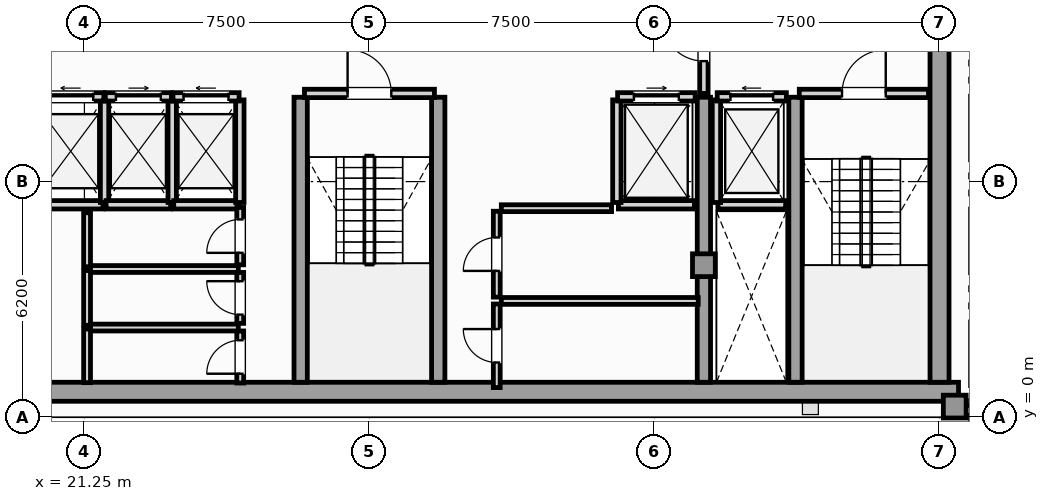
"""IFC4 building model, lengths in metres.
Left out: names, types, materials, properties, quantities, classifications, styles, units other than length and angle.
Written with IfcOpenShell. Run it as: python <this file> out.ifc"""

import sys

from ifc_helpers import new_model, si_unit, direction, frame, frame_2d, origin, origin_2d, place, context, subcontext, project, spatial, rectangle, extrude, element, fill, save


model = new_model("IFC4")
c1 = context("Model", 3, precision=1e-05, world=origin(), true_north=direction((0.0, 1.0)))
c2 = subcontext(c1, "Body", "Model", "MODEL_VIEW")
j1 = project(units=[si_unit("LENGTHUNIT", "METRE"), si_unit("PLANEANGLEUNIT", "RADIAN")], contexts=[c1])
p1 = place(None, origin())
s1 = spatial("IfcSite", under=j1, at=p1, CompositionType="ELEMENT")
p2 = place(p1, origin())
s2 = spatial("IfcBuilding", under=s1, at=p2, CompositionType="ELEMENT")
p3 = place(p2, frame((0.0, 0.0, 337.5)))
s3 = spatial("IfcBuildingStorey", under=s2, at=p3, CompositionType="ELEMENT", Elevation=337.5)
p4 = place(p3, frame((13.25, 0.67, 0.0), z_axis=(0.0, 0.0, 1.0), x_axis=(1.0, 0.0, 0.0)))
e1 = element("IfcWall", 1, at=p4, inside=s3, PredefinedType="SHEAR", context=c2, shape_type="SweptSolid", body=[
    extrude(rectangle(XDim=31.0, YDim=0.5, at=frame_2d((15.5, 0.0))), origin(), (0.0, 0.0, 1.0), 3.63),
])
p5 = place(p3, frame((43.75, 0.92, 0.0), z_axis=(0.0, 0.0, 1.0), x_axis=(0.0, 1.0, 0.0)))
e2 = element("IfcWall", 2, at=p5, inside=s3, PredefinedType="SHEAR", context=c2, shape_type="SweptSolid", body=[
    extrude(rectangle(XDim=10.53, YDim=0.5, at=frame_2d((5.265, 0.0))), origin(), (0.0, 0.0, 1.0), 3.63),
])
for number, where, z_axis, x_axis in (
    (3, (26.94, 0.92, 0.0), (0.0, 0.0, 1.0), (0.0, 1.0, 0.0)),
    (4, (30.56, 0.92, 0.0), (0.0, 0.0, 1.0), (0.0, 1.0, 0.0)),
    (5, (37.55, 0.92, 0.0), (0.0, 0.0, 1.0), (0.0, 1.0, 0.0)),
    (6, (39.96, 0.92, 0.0), (0.0, 0.0, 1.0), (0.0, 1.0, 0.0)),
):
    element("IfcWall", number, at=place(p3, frame(where, z_axis=z_axis, x_axis=x_axis)), inside=s3, PredefinedType="SHEAR", context=c2, shape_type="SweptSolid", body=[
        extrude(rectangle(XDim=7.5, YDim=0.35, at=frame_2d((3.75, 0.0))), origin(), (0.0, 0.0, 1.0), 3.63),
    ])
for number, where, z_axis, x_axis in (
    (7, (44.15, 0.28, 0.0), (0.0, 0.0, 1.0), (1.0, 0.0, 0.0)),
    (8, (37.55, 4.0, 0.0), (0.0, 0.0, 1.0), (1.0, 0.0, 0.0)),
):
    element("IfcColumn", number, at=place(p3, frame(where, z_axis=z_axis, x_axis=x_axis)), inside=s3, PredefinedType="COLUMN", context=c2, shape_type="SweptSolid", body=[
        extrude(rectangle(XDim=0.6, YDim=0.6, at=origin_2d()), origin(), (0.0, 0.0, 1.0), 3.85),
    ])
p6 = place(p3, frame((44.25, 0.18, 0.0), z_axis=(0.0, 0.0, 1.0), x_axis=(1.0, 0.0, 0.0)))
e9 = element("IfcWall", 9, at=p6, inside=s3, PredefinedType="SOLIDWALL", context=c2, shape_type="SweptSolid", body=[
    extrude(rectangle(XDim=0.662, YDim=0.26, at=frame_2d((0.331, 0.0))), origin(), (0.0, 0.0, 1.0), 3.63),
])
p7 = place(p3, frame((37.92, 5.59, 0.0), z_axis=(0.0, 0.0, 1.0), x_axis=(1.0, 0.0, 0.0)))
e10 = element("IfcWall", 10, at=p7, inside=s3, PredefinedType="SOLIDWALL", context=c2, shape_type="SweptSolid", body=[
    extrude(rectangle(XDim=1.78, YDim=0.22, at=frame_2d((0.89, 0.0))), origin(), (0.0, 0.0, 1.0), 3.63),
])
p8 = place(p3, frame((37.88, 5.65, 0.0), z_axis=(0.0, 0.0, 1.0), x_axis=(0.0, 1.0, 0.0)))
e11 = element("IfcWall", 11, at=p8, inside=s3, PredefinedType="SOLIDWALL", context=c2, shape_type="SweptSolid", body=[
    extrude(rectangle(XDim=2.7, YDim=0.22, at=frame_2d((1.35, 0.0))), origin(), (0.0, 0.0, 1.0), 3.63),
])
p9 = place(p3, frame((37.9, 8.43, 0.0), z_axis=(0.0, 0.0, 1.0), x_axis=(1.0, 0.0, 0.0)))
e12 = element("IfcWall", 12, at=p9, inside=s3, PredefinedType="SOLIDWALL", context=c2, shape_type="SweptSolid", body=[
    extrude(rectangle(XDim=1.82, YDim=0.22, at=frame_2d((0.91, 0.0))), origin(), (0.0, 0.0, 1.0), 3.63),
])
p10 = place(p9, frame((0.35, 0.0, 0.0)))
e13 = element("IfcOpeningElement", 13, at=p10, cuts=e12, PredefinedType="OPENING", context=c2, shape_type="SweptSolid", body=[
    extrude(rectangle(XDim=1.12, YDim=2.25, at=frame_2d((0.56, 1.125))), frame((0.0, 0.12, 0.0), z_axis=(0.0, -1.0, 0.0), x_axis=(1.0, 0.0, 0.0)), (0.0, 0.0, 1.0), 0.24),
])
p11 = place(p3, frame((35.3, 5.59, 0.0), z_axis=(0.0, 0.0, 1.0), x_axis=(1.0, 0.0, 0.0)))
e14 = element("IfcWall", 14, at=p11, inside=s3, PredefinedType="SOLIDWALL", context=c2, shape_type="SweptSolid", body=[
    extrude(rectangle(XDim=2.0, YDim=0.22, at=frame_2d((1.0, 0.0))), origin(), (0.0, 0.0, 1.0), 3.63),
])
p12 = place(p3, frame((35.26, 5.65, 0.0), z_axis=(0.0, 0.0, 1.0), x_axis=(0.0, 1.0, 0.0)))
e15 = element("IfcWall", 15, at=p12, inside=s3, PredefinedType="SOLIDWALL", context=c2, shape_type="SweptSolid", body=[
    extrude(rectangle(XDim=2.7, YDim=0.22, at=frame_2d((1.35, 0.0))), origin(), (0.0, 0.0, 1.0), 3.63),
])
p13 = place(p3, frame((35.28, 8.43, 0.0), z_axis=(0.0, 0.0, 1.0), x_axis=(1.0, 0.0, 0.0)))
e16 = element("IfcWall", 16, at=p13, inside=s3, PredefinedType="SOLIDWALL", context=c2, shape_type="SweptSolid", body=[
    extrude(rectangle(XDim=2.04, YDim=0.22, at=frame_2d((1.02, 0.0))), origin(), (0.0, 0.0, 1.0), 3.63),
])
p14 = place(p13, frame((0.43, 0.0, 0.0)))
e17 = element("IfcOpeningElement", 17, at=p14, cuts=e16, PredefinedType="OPENING", context=c2, shape_type="SweptSolid", body=[
    extrude(rectangle(XDim=1.18, YDim=2.2, at=frame_2d((0.59, 1.1))), frame((0.0, 0.12, 0.0), z_axis=(0.0, -1.0, 0.0), x_axis=(1.0, 0.0, 0.0)), (0.0, 0.0, 1.0), 0.24),
])
p15 = place(p3, frame((20.04, 5.59, 0.0), z_axis=(0.0, 0.0, 1.0), x_axis=(1.0, 0.0, 0.0)))
e18 = element("IfcWall", 18, at=p15, inside=s3, PredefinedType="SOLIDWALL", context=c2, shape_type="SweptSolid", body=[
    extrude(rectangle(XDim=1.7, YDim=0.22, at=frame_2d((0.85, 0.0))), origin(), (0.0, 0.0, 1.0), 3.63),
])
p16 = place(p3, frame((21.78, 5.65, 0.0), z_axis=(0.0, 0.0, 1.0), x_axis=(0.0, 1.0, 0.0)))
e19 = element("IfcWall", 19, at=p16, inside=s3, PredefinedType="SOLIDWALL", context=c2, shape_type="SweptSolid", body=[
    extrude(rectangle(XDim=2.7, YDim=0.22, at=frame_2d((1.35, 0.0))), origin(), (0.0, 0.0, 1.0), 3.63),
])
p17 = place(p3, frame((20.02, 8.43, 0.0), z_axis=(0.0, 0.0, 1.0), x_axis=(1.0, 0.0, 0.0)))
e20 = element("IfcWall", 20, at=p17, inside=s3, PredefinedType="SOLIDWALL", context=c2, shape_type="SweptSolid", body=[
    extrude(rectangle(XDim=1.74, YDim=0.22, at=frame_2d((0.87, 0.0))), origin(), (0.0, 0.0, 1.0), 3.63),
])
p18 = place(p17, frame((0.28, 0.0, 0.0)))
e21 = element("IfcOpeningElement", 21, at=p18, cuts=e20, PredefinedType="OPENING", context=c2, shape_type="SweptSolid", body=[
    extrude(rectangle(XDim=1.18, YDim=2.2, at=frame_2d((0.59, 1.1))), frame((0.0, 0.12, 0.0), z_axis=(0.0, -1.0, 0.0), x_axis=(1.0, 0.0, 0.0)), (0.0, 0.0, 1.0), 0.24),
])
p19 = place(p3, frame((21.82, 5.59, 0.0), z_axis=(0.0, 0.0, 1.0), x_axis=(1.0, 0.0, 0.0)))
e22 = element("IfcWall", 22, at=p19, inside=s3, PredefinedType="SOLIDWALL", context=c2, shape_type="SweptSolid", body=[
    extrude(rectangle(XDim=1.7, YDim=0.22, at=frame_2d((0.85, 0.0))), origin(), (0.0, 0.0, 1.0), 3.63),
])
p20 = place(p3, frame((23.56, 5.65, 0.0), z_axis=(0.0, 0.0, 1.0), x_axis=(0.0, 1.0, 0.0)))
e23 = element("IfcWall", 23, at=p20, inside=s3, PredefinedType="SOLIDWALL", context=c2, shape_type="SweptSolid", body=[
    extrude(rectangle(XDim=2.7, YDim=0.22, at=frame_2d((1.35, 0.0))), origin(), (0.0, 0.0, 1.0), 3.63),
])
p21 = place(p3, frame((21.8, 8.43, 0.0), z_axis=(0.0, 0.0, 1.0), x_axis=(1.0, 0.0, 0.0)))
e24 = element("IfcWall", 24, at=p21, inside=s3, PredefinedType="SOLIDWALL", context=c2, shape_type="SweptSolid", body=[
    extrude(rectangle(XDim=1.74, YDim=0.22, at=frame_2d((0.87, 0.0))), origin(), (0.0, 0.0, 1.0), 3.63),
])
p22 = place(p21, frame((0.28, 0.0, 0.0)))
e25 = element("IfcOpeningElement", 25, at=p22, cuts=e24, PredefinedType="OPENING", context=c2, shape_type="SweptSolid", body=[
    extrude(rectangle(XDim=1.18, YDim=2.2, at=frame_2d((0.59, 1.1))), frame((0.0, 0.12, 0.0), z_axis=(0.0, -1.0, 0.0), x_axis=(1.0, 0.0, 0.0)), (0.0, 0.0, 1.0), 0.24),
])
p23 = place(p3, frame((23.6, 5.59, 0.0), z_axis=(0.0, 0.0, 1.0), x_axis=(1.0, 0.0, 0.0)))
e26 = element("IfcWall", 26, at=p23, inside=s3, PredefinedType="SOLIDWALL", context=c2, shape_type="SweptSolid", body=[
    extrude(rectangle(XDim=1.7, YDim=0.22, at=frame_2d((0.85, 0.0))), origin(), (0.0, 0.0, 1.0), 3.63),
])
p24 = place(p3, frame((25.34, 5.65, 0.0), z_axis=(0.0, 0.0, 1.0), x_axis=(0.0, 1.0, 0.0)))
e27 = element("IfcWall", 27, at=p24, inside=s3, PredefinedType="SOLIDWALL", context=c2, shape_type="SweptSolid", body=[
    extrude(rectangle(XDim=2.7, YDim=0.22, at=frame_2d((1.35, 0.0))), origin(), (0.0, 0.0, 1.0), 3.63),
])
p25 = place(p3, frame((23.58, 8.43, 0.0), z_axis=(0.0, 0.0, 1.0), x_axis=(1.0, 0.0, 0.0)))
e28 = element("IfcWall", 28, at=p25, inside=s3, PredefinedType="SOLIDWALL", context=c2, shape_type="SweptSolid", body=[
    extrude(rectangle(XDim=1.74, YDim=0.22, at=frame_2d((0.87, 0.0))), origin(), (0.0, 0.0, 1.0), 3.63),
])
p26 = place(p25, frame((0.28, 0.0, 0.0)))
e29 = element("IfcOpeningElement", 29, at=p26, cuts=e28, PredefinedType="OPENING", context=c2, shape_type="SweptSolid", body=[
    extrude(rectangle(XDim=1.18, YDim=2.2, at=frame_2d((0.59, 1.1))), frame((0.0, 0.12, 0.0), z_axis=(0.0, -1.0, 0.0), x_axis=(1.0, 0.0, 0.0)), (0.0, 0.0, 1.0), 0.24),
])
p27 = place(p3, frame((40.06, 8.52, 0.0), z_axis=(0.0, 0.0, 1.0), x_axis=(1.0, 0.0, 0.0)))
e30 = element("IfcWall", 30, at=p27, inside=s3, PredefinedType="SOLIDWALL", context=c2, shape_type="SweptSolid", body=[
    extrude(rectangle(XDim=3.4, YDim=0.22, at=frame_2d((1.7, 0.0))), origin(), (0.0, 0.0, 1.0), 3.63),
])
p28 = place(p27, frame((1.125, 0.0, 0.0)))
e31 = element("IfcOpeningElement", 31, at=p28, cuts=e30, PredefinedType="OPENING", context=c2, shape_type="SweptSolid", body=[
    extrude(rectangle(XDim=1.15, YDim=2.2, at=frame_2d((0.575, 1.1))), frame((0.0, 0.12, 0.0), z_axis=(0.0, -1.0, 0.0), x_axis=(1.0, 0.0, 0.0)), (0.0, 0.0, 1.0), 0.24),
])
p29 = place(p3, frame((27.04, 8.52, 0.0), z_axis=(0.0, 0.0, 1.0), x_axis=(1.0, 0.0, 0.0)))
e32 = element("IfcWall", 32, at=p29, inside=s3, PredefinedType="SOLIDWALL", context=c2, shape_type="SweptSolid", body=[
    extrude(rectangle(XDim=3.42, YDim=0.22, at=frame_2d((1.71, 0.0))), origin(), (0.0, 0.0, 1.0), 3.63),
])
p30 = place(p29, frame((1.135, 0.0, 0.0)))
e33 = element("IfcOpeningElement", 33, at=p30, cuts=e32, PredefinedType="OPENING", context=c2, shape_type="SweptSolid", body=[
    extrude(rectangle(XDim=1.15, YDim=2.2, at=frame_2d((0.575, 1.1))), frame((0.0, 0.12, 0.0), z_axis=(0.0, -1.0, 0.0), x_axis=(1.0, 0.0, 0.0)), (0.0, 0.0, 1.0), 0.24),
])
p31 = place(p3, frame((37.55, 8.52, 0.0), z_axis=(0.0, 0.0, 1.0), x_axis=(0.0, 1.0, 0.0)))
e34 = element("IfcWall", 34, at=p31, inside=s3, PredefinedType="SOLIDWALL", context=c2, shape_type="SweptSolid", body=[
    extrude(rectangle(XDim=2.8, YDim=0.22, at=frame_2d((1.4, 0.0))), origin(), (0.0, 0.0, 1.0), 3.085),
])
p32 = place(p31, frame((0.85, 0.0, 0.0)))
e35 = element("IfcOpeningElement", 35, at=p32, cuts=e34, PredefinedType="OPENING", context=c2, shape_type="SweptSolid", body=[
    extrude(rectangle(XDim=1.1, YDim=2.2, at=frame_2d((0.55, 1.1))), frame((0.0, 0.12, 0.0), z_axis=(0.0, -1.0, 0.0), x_axis=(1.0, 0.0, 0.0)), (0.0, 0.0, 1.0), 0.24),
])
p33 = place(p3, frame((25.35, 0.9, 0.0), z_axis=(0.0, 0.0, 1.0), x_axis=(0.0, 1.0, 0.0)))
e36 = element("IfcWall", 36, at=p33, inside=s3, PredefinedType="PARTITIONING", context=c2, shape_type="SweptSolid", body=[
    extrude(rectangle(XDim=1.37, YDim=0.18, at=frame_2d((0.685, 0.0))), origin(), (0.0, 0.0, 1.0), 3.63),
])
p34 = place(p33, frame((0.245, 0.0, 0.0)))
e37 = element("IfcOpeningElement", 37, at=p34, cuts=e36, PredefinedType="OPENING", context=c2, shape_type="SweptSolid", body=[
    extrude(rectangle(XDim=0.88, YDim=2.05, at=frame_2d((0.44, 1.025))), frame((0.0, 0.1, 0.0), z_axis=(0.0, -1.0, 0.0), x_axis=(1.0, 0.0, 0.0)), (0.0, 0.0, 1.0), 0.2),
])
p35 = place(p3, frame((21.36, 2.36, 0.0), z_axis=(0.0, 0.0, 1.0), x_axis=(1.0, 0.0, 0.0)))
e38 = element("IfcWall", 38, at=p35, inside=s3, PredefinedType="PARTITIONING", context=c2, shape_type="SweptSolid", body=[
    extrude(rectangle(XDim=3.94, YDim=0.18, at=frame_2d((1.97, 0.0))), origin(), (0.0, 0.0, 1.0), 3.63),
])
p36 = place(p3, frame((21.32, 0.91, 0.0), z_axis=(0.0, 0.0, 1.0), x_axis=(0.0, 1.0, 0.0)))
e39 = element("IfcWall", 39, at=p36, inside=s3, PredefinedType="PARTITIONING", context=c2, shape_type="SweptSolid", body=[
    extrude(rectangle(XDim=1.41, YDim=0.18, at=frame_2d((0.705, 0.0))), origin(), (0.0, 0.0, 1.0), 3.63),
])
p37 = place(p3, frame((25.35, 2.47, 0.0), z_axis=(0.0, 0.0, 1.0), x_axis=(0.0, 1.0, 0.0)))
e40 = element("IfcWall", 40, at=p37, inside=s3, PredefinedType="PARTITIONING", context=c2, shape_type="SweptSolid", body=[
    extrude(rectangle(XDim=1.34, YDim=0.18, at=frame_2d((0.67, 0.0))), origin(), (0.0, 0.0, 1.0), 3.63),
])
p38 = place(p37, frame((0.23, 0.0, 0.0)))
e41 = element("IfcOpeningElement", 41, at=p38, cuts=e40, PredefinedType="OPENING", context=c2, shape_type="SweptSolid", body=[
    extrude(rectangle(XDim=0.88, YDim=2.05, at=frame_2d((0.44, 1.025))), frame((0.0, 0.1, 0.0), z_axis=(0.0, -1.0, 0.0), x_axis=(1.0, 0.0, 0.0)), (0.0, 0.0, 1.0), 0.2),
])
p39 = place(p3, frame((21.36, 3.9, 0.0), z_axis=(0.0, 0.0, 1.0), x_axis=(1.0, 0.0, 0.0)))
e42 = element("IfcWall", 42, at=p39, inside=s3, PredefinedType="PARTITIONING", context=c2, shape_type="SweptSolid", body=[
    extrude(rectangle(XDim=3.94, YDim=0.18, at=frame_2d((1.97, 0.0))), origin(), (0.0, 0.0, 1.0), 3.63),
])
p40 = place(p3, frame((21.32, 2.42, 0.0), z_axis=(0.0, 0.0, 1.0), x_axis=(0.0, 1.0, 0.0)))
e43 = element("IfcWall", 43, at=p40, inside=s3, PredefinedType="PARTITIONING", context=c2, shape_type="SweptSolid", body=[
    extrude(rectangle(XDim=1.44, YDim=0.18, at=frame_2d((0.72, 0.0))), origin(), (0.0, 0.0, 1.0), 3.63),
])
p41 = place(p3, frame((25.35, 4.01, 0.0), z_axis=(0.0, 0.0, 1.0), x_axis=(0.0, 1.0, 0.0)))
e44 = element("IfcWall", 44, at=p41, inside=s3, PredefinedType="PARTITIONING", context=c2, shape_type="SweptSolid", body=[
    extrude(rectangle(XDim=1.51, YDim=0.18, at=frame_2d((0.755, 0.0))), origin(), (0.0, 0.0, 1.0), 3.63),
])
p42 = place(p41, frame((0.315, 0.0, 0.0)))
e45 = element("IfcOpeningElement", 45, at=p42, cuts=e44, PredefinedType="OPENING", context=c2, shape_type="SweptSolid", body=[
    extrude(rectangle(XDim=0.88, YDim=2.05, at=frame_2d((0.44, 1.025))), frame((0.0, 0.1, 0.0), z_axis=(0.0, -1.0, 0.0), x_axis=(1.0, 0.0, 0.0)), (0.0, 0.0, 1.0), 0.2),
])
p43 = place(p3, frame((21.32, 3.96, 0.0), z_axis=(0.0, 0.0, 1.0), x_axis=(0.0, 1.0, 0.0)))
e46 = element("IfcWall", 46, at=p43, inside=s3, PredefinedType="PARTITIONING", context=c2, shape_type="SweptSolid", body=[
    extrude(rectangle(XDim=1.42, YDim=0.18, at=frame_2d((0.71, 0.0))), origin(), (0.0, 0.0, 1.0), 3.63),
])
p44 = place(p3, frame((32.1, 0.78, 0.0), z_axis=(0.0, 0.0, 1.0), x_axis=(0.0, 1.0, 0.0)))
e47 = element("IfcWall", 47, at=p44, inside=s3, PredefinedType="PARTITIONING", context=c2, shape_type="SweptSolid", body=[
    extrude(rectangle(XDim=2.2, YDim=0.18, at=frame_2d((1.1, 0.0))), origin(), (0.0, 0.0, 1.0), 3.63),
])
p45 = place(p44, frame((0.66, 0.0, 0.0)))
e48 = element("IfcOpeningElement", 48, at=p45, cuts=e47, PredefinedType="OPENING", context=c2, shape_type="SweptSolid", body=[
    extrude(rectangle(XDim=0.88, YDim=2.05, at=frame_2d((0.44, 1.025))), frame((0.0, 0.1, 0.0), z_axis=(0.0, -1.0, 0.0), x_axis=(1.0, 0.0, 0.0)), (0.0, 0.0, 1.0), 0.2),
])
p46 = place(p3, frame((32.22, 3.06, 0.0), z_axis=(0.0, 0.0, 1.0), x_axis=(1.0, 0.0, 0.0)))
e49 = element("IfcWall", 49, at=p46, inside=s3, PredefinedType="PARTITIONING", context=c2, shape_type="SweptSolid", body=[
    extrude(rectangle(XDim=5.18, YDim=0.18, at=frame_2d((2.59, 0.0))), origin(), (0.0, 0.0, 1.0), 3.63),
])
p47 = place(p3, frame((32.1, 3.16, 0.0), z_axis=(0.0, 0.0, 1.0), x_axis=(0.0, 1.0, 0.0)))
e50 = element("IfcWall", 50, at=p47, inside=s3, PredefinedType="PARTITIONING", context=c2, shape_type="SweptSolid", body=[
    extrude(rectangle(XDim=2.26, YDim=0.18, at=frame_2d((1.13, 0.0))), origin(), (0.0, 0.0, 1.0), 3.63),
])
p48 = place(p47, frame((0.69, 0.0, 0.0)))
e51 = element("IfcOpeningElement", 51, at=p48, cuts=e50, PredefinedType="OPENING", context=c2, shape_type="SweptSolid", body=[
    extrude(rectangle(XDim=0.88, YDim=2.05, at=frame_2d((0.44, 1.025))), frame((0.0, 0.1, 0.0), z_axis=(0.0, -1.0, 0.0), x_axis=(1.0, 0.0, 0.0)), (0.0, 0.0, 1.0), 0.2),
])
p49 = place(p3, frame((32.22, 5.5, 0.0), z_axis=(0.0, 0.0, 1.0), x_axis=(1.0, 0.0, 0.0)))
e52 = element("IfcWall", 52, at=p49, inside=s3, PredefinedType="PARTITIONING", context=c2, shape_type="SweptSolid", body=[
    extrude(rectangle(XDim=2.9, YDim=0.18, at=frame_2d((1.45, 0.0))), origin(), (0.0, 0.0, 1.0), 3.63),
])
p50 = place(p10, origin())
e53 = element("IfcDoor", 53, at=p50, inside=s3, OperationType="SLIDING_TO_LEFT", PredefinedType="DOOR", context=c2, shape_type="SweptSolid", body=[
    extrude(rectangle(XDim=1.12, YDim=2.25, at=frame_2d((0.56, 1.125))), frame((0.0, 0.025, 0.0), z_axis=(0.0, -1.0, 0.0), x_axis=(1.0, 0.0, 0.0)), (0.0, 0.0, 1.0), 0.05),
])
fill(e13, e53)
p51 = place(p14, origin())
e54 = element("IfcDoor", 54, at=p51, inside=s3, OperationType="SLIDING_TO_RIGHT", PredefinedType="DOOR", context=c2, shape_type="SweptSolid", body=[
    extrude(rectangle(XDim=1.18, YDim=2.2, at=frame_2d((0.59, 1.1))), frame((0.0, 0.025, 0.0), z_axis=(0.0, -1.0, 0.0), x_axis=(1.0, 0.0, 0.0)), (0.0, 0.0, 1.0), 0.05),
])
fill(e17, e54)
p52 = place(p18, origin())
e55 = element("IfcDoor", 55, at=p52, inside=s3, OperationType="SLIDING_TO_LEFT", PredefinedType="DOOR", context=c2, shape_type="SweptSolid", body=[
    extrude(rectangle(XDim=1.18, YDim=2.2, at=frame_2d((0.59, 1.1))), frame((0.0, 0.025, 0.0), z_axis=(0.0, -1.0, 0.0), x_axis=(1.0, 0.0, 0.0)), (0.0, 0.0, 1.0), 0.05),
])
fill(e21, e55)
p53 = place(p22, origin())
e56 = element("IfcDoor", 56, at=p53, inside=s3, OperationType="SLIDING_TO_RIGHT", PredefinedType="DOOR", context=c2, shape_type="SweptSolid", body=[
    extrude(rectangle(XDim=1.18, YDim=2.2, at=frame_2d((0.59, 1.1))), frame((0.0, 0.025, 0.0), z_axis=(0.0, -1.0, 0.0), x_axis=(1.0, 0.0, 0.0)), (0.0, 0.0, 1.0), 0.05),
])
fill(e25, e56)
p54 = place(p26, origin())
e57 = element("IfcDoor", 57, at=p54, inside=s3, OperationType="SLIDING_TO_LEFT", PredefinedType="DOOR", context=c2, shape_type="SweptSolid", body=[
    extrude(rectangle(XDim=1.18, YDim=2.2, at=frame_2d((0.59, 1.1))), frame((0.0, 0.025, 0.0), z_axis=(0.0, -1.0, 0.0), x_axis=(1.0, 0.0, 0.0)), (0.0, 0.0, 1.0), 0.05),
])
fill(e29, e57)
p55 = place(p28, origin())
e58 = element("IfcDoor", 58, at=p55, inside=s3, OperationType="SINGLE_SWING_RIGHT", PredefinedType="DOOR", context=c2, shape_type="SweptSolid", body=[
    extrude(rectangle(XDim=1.15, YDim=2.2, at=frame_2d((0.575, 1.1))), frame((0.0, 0.025, 0.0), z_axis=(0.0, -1.0, 0.0), x_axis=(1.0, 0.0, 0.0)), (0.0, 0.0, 1.0), 0.05),
])
fill(e31, e58)
p56 = place(p30, origin())
e59 = element("IfcDoor", 59, at=p56, inside=s3, OperationType="SINGLE_SWING_LEFT", PredefinedType="DOOR", context=c2, shape_type="SweptSolid", body=[
    extrude(rectangle(XDim=1.15, YDim=2.2, at=frame_2d((0.575, 1.1))), frame((0.0, 0.025, 0.0), z_axis=(0.0, -1.0, 0.0), x_axis=(1.0, 0.0, 0.0)), (0.0, 0.0, 1.0), 0.05),
])
fill(e33, e59)
p57 = place(p32, origin())
e60 = element("IfcDoor", 60, at=p57, inside=s3, OperationType="SINGLE_SWING_RIGHT", PredefinedType="DOOR", context=c2, shape_type="SweptSolid", body=[
    extrude(rectangle(XDim=1.1, YDim=2.2, at=frame_2d((0.55, 1.1))), frame((0.0, 0.025, 0.0), z_axis=(0.0, -1.0, 0.0), x_axis=(1.0, 0.0, 0.0)), (0.0, 0.0, 1.0), 0.05),
])
fill(e35, e60)
p58 = place(p34, origin())
e61 = element("IfcDoor", 61, at=p58, inside=s3, OperationType="SINGLE_SWING_LEFT", PredefinedType="DOOR", context=c2, shape_type="SweptSolid", body=[
    extrude(rectangle(XDim=0.88, YDim=2.05, at=frame_2d((0.44, 1.025))), frame((0.0, 0.025, 0.0), z_axis=(0.0, -1.0, 0.0), x_axis=(1.0, 0.0, 0.0)), (0.0, 0.0, 1.0), 0.05),
])
fill(e37, e61)
p59 = place(p38, origin())
e62 = element("IfcDoor", 62, at=p59, inside=s3, OperationType="SINGLE_SWING_RIGHT", PredefinedType="DOOR", context=c2, shape_type="SweptSolid", body=[
    extrude(rectangle(XDim=0.88, YDim=2.05, at=frame_2d((0.44, 1.025))), frame((0.0, 0.025, 0.0), z_axis=(0.0, -1.0, 0.0), x_axis=(1.0, 0.0, 0.0)), (0.0, 0.0, 1.0), 0.05),
])
fill(e41, e62)
p60 = place(p42, origin())
e63 = element("IfcDoor", 63, at=p60, inside=s3, OperationType="SINGLE_SWING_LEFT", PredefinedType="DOOR", context=c2, shape_type="SweptSolid", body=[
    extrude(rectangle(XDim=0.88, YDim=2.05, at=frame_2d((0.44, 1.025))), frame((0.0, 0.025, 0.0), z_axis=(0.0, -1.0, 0.0), x_axis=(1.0, 0.0, 0.0)), (0.0, 0.0, 1.0), 0.05),
])
fill(e45, e63)
p61 = place(p45, origin())
e64 = element("IfcDoor", 64, at=p61, inside=s3, OperationType="SINGLE_SWING_RIGHT", PredefinedType="DOOR", context=c2, shape_type="SweptSolid", body=[
    extrude(rectangle(XDim=0.88, YDim=2.05, at=frame_2d((0.44, 1.025))), frame((0.0, 0.025, 0.0), z_axis=(0.0, -1.0, 0.0), x_axis=(1.0, 0.0, 0.0)), (0.0, 0.0, 1.0), 0.05),
])
fill(e48, e64)
p62 = place(p48, origin())
e65 = element("IfcDoor", 65, at=p62, inside=s3, OperationType="SINGLE_SWING_LEFT", PredefinedType="DOOR", context=c2, shape_type="SweptSolid", body=[
    extrude(rectangle(XDim=0.88, YDim=2.05, at=frame_2d((0.44, 1.025))), frame((0.0, 0.025, 0.0), z_axis=(0.0, -1.0, 0.0), x_axis=(1.0, 0.0, 0.0)), (0.0, 0.0, 1.0), 0.05),
])
fill(e51, e65)
save(model, sys.argv[1])
